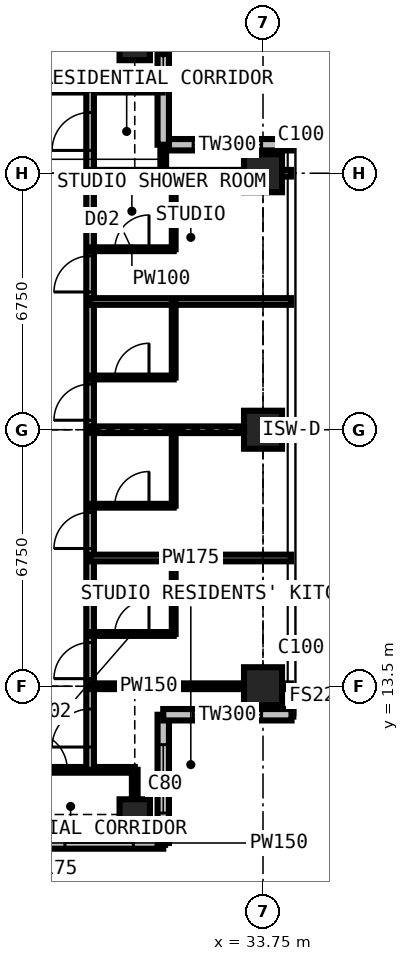
"""IFC4 building model, lengths in metres.
Left out: names, types, materials, properties, quantities, classifications, styles, units other than length and angle.
Written with IfcOpenShell. Run it as: python <this file> out.ifc"""

import sys

from ifc_helpers import new_model, si_unit, direction, frame, frame_2d, origin, origin_2d, place, context, subcontext, project, spatial, rectangle, extrude, element, fill, save


model = new_model("IFC4")
c1 = context("Model", 3, precision=1e-05, world=origin(), true_north=direction((0.0, 1.0)))
c2 = subcontext(c1, "Body", "Model", "MODEL_VIEW")
j1 = project(units=[si_unit("LENGTHUNIT", "METRE"), si_unit("PLANEANGLEUNIT", "RADIAN")], contexts=[c1])
p1 = place(None, origin())
s1 = spatial("IfcSite", under=j1, at=p1, CompositionType="ELEMENT")
p2 = place(p1, origin())
s2 = spatial("IfcBuilding", under=s1, at=p2, CompositionType="ELEMENT")
p3 = place(p2, frame((0.0, 0.0, 243.9)))
s3 = spatial("IfcBuildingStorey", under=s2, at=p3, CompositionType="ELEMENT", Elevation=243.9)
for number, where, z_axis, x_axis in (
    (1, (30.375, 10.125, 0.0), (0.0, 0.0, 1.0), (1.0, 0.0, 0.0)),
    (2, (30.375, 30.375, 0.0), (0.0, 0.0, 1.0), (1.0, 0.0, 0.0)),
):
    element("IfcColumn", number, at=place(p3, frame(where, z_axis=z_axis, x_axis=x_axis)), inside=s3, PredefinedType="COLUMN", context=c2, shape_type="SweptSolid", body=[
        extrude(rectangle(XDim=0.8, YDim=0.8, at=origin_2d()), origin(), (0.0, 0.0, 1.0), 3.6),
    ])
for number, where, z_axis, x_axis in (
    (3, (33.75, 13.5, 0.0), (0.0, 0.0, 1.0), (1.0, 0.0, 0.0)),
    (4, (33.75, 20.25, 0.0), (0.0, 0.0, 1.0), (1.0, 0.0, 0.0)),
    (5, (33.75, 27.0, 0.0), (0.0, 0.0, 1.0), (1.0, 0.0, 0.0)),
):
    element("IfcColumn", number, at=place(p3, frame(where, z_axis=z_axis, x_axis=x_axis)), inside=s3, PredefinedType="COLUMN", context=c2, shape_type="SweptSolid", body=[
        extrude(rectangle(XDim=1.0, YDim=1.0, at=origin_2d()), origin(), (0.0, 0.0, 1.0), 3.6),
    ])
p4 = place(p3, frame((34.5, 27.75, 0.0), z_axis=(0.0, 0.0, 1.0), x_axis=(-1.0, 0.0, 0.0)))
e6 = element("IfcWall", 6, at=p4, inside=s3, PredefinedType="SOLIDWALL", context=c2, shape_type="SweptSolid", body=[
    extrude(rectangle(XDim=3.375, YDim=0.3, at=frame_2d((1.688, 0.0))), origin(), (0.0, 0.0, 1.0), 3.375),
])
p5 = place(p4, frame((0.788, 0.0, 0.6)))
e7 = element("IfcOpeningElement", 7, at=p5, cuts=e6, PredefinedType="OPENING", context=c2, shape_type="SweptSolid", body=[
    extrude(rectangle(XDim=1.8, YDim=2.1, at=frame_2d((0.9, 1.05))), frame((0.0, 0.16, 0.0), z_axis=(0.0, -1.0, 0.0), x_axis=(1.0, 0.0, 0.0)), (0.0, 0.0, 1.0), 0.32),
])
p6 = place(p3, frame((31.125, 27.75, 0.0), z_axis=(0.0, 0.0, 1.0), x_axis=(0.0, 1.0, 0.0)))
e8 = element("IfcWall", 8, at=p6, inside=s3, PredefinedType="SOLIDWALL", context=c2, shape_type="SweptSolid", body=[
    extrude(rectangle(XDim=3.375, YDim=0.3, at=frame_2d((1.688, 0.0))), origin(), (0.0, 0.0, 1.0), 3.375),
])
p7 = place(p6, frame((1.663, 0.0, 0.9)))
e9 = element("IfcOpeningElement", 9, at=p7, cuts=e8, PredefinedType="OPENING", context=c2, shape_type="SweptSolid", body=[
    extrude(rectangle(XDim=1.5, YDim=1.8, at=frame_2d((0.75, 0.9))), frame((0.0, 0.16, 0.0), z_axis=(0.0, -1.0, 0.0), x_axis=(1.0, 0.0, 0.0)), (0.0, 0.0, 1.0), 0.32),
])
p8 = place(p3, frame((27.75, 9.375, 0.0), z_axis=(0.0, 0.0, 1.0), x_axis=(1.0, 0.0, 0.0)))
e10 = element("IfcWall", 10, at=p8, inside=s3, PredefinedType="SOLIDWALL", context=c2, shape_type="SweptSolid", body=[
    extrude(rectangle(XDim=3.375, YDim=0.3, at=frame_2d((1.688, 0.0))), origin(), (0.0, 0.0, 1.0), 3.375),
])
p9 = place(p8, frame((0.788, 0.0, 0.6)))
e11 = element("IfcOpeningElement", 11, at=p9, cuts=e10, PredefinedType="OPENING", context=c2, shape_type="SweptSolid", body=[
    extrude(rectangle(XDim=1.8, YDim=2.1, at=frame_2d((0.9, 1.05))), frame((0.0, 0.16, 0.0), z_axis=(0.0, -1.0, 0.0), x_axis=(1.0, 0.0, 0.0)), (0.0, 0.0, 1.0), 0.32),
])
p10 = place(p3, frame((31.125, 9.375, 0.0), z_axis=(0.0, 0.0, 1.0), x_axis=(0.0, 1.0, 0.0)))
e12 = element("IfcWall", 12, at=p10, inside=s3, PredefinedType="SOLIDWALL", context=c2, shape_type="SweptSolid", body=[
    extrude(rectangle(XDim=3.375, YDim=0.3, at=frame_2d((1.688, 0.0))), origin(), (0.0, 0.0, 1.0), 3.375),
])
p11 = place(p10, frame((0.788, 0.0, 0.6)))
e13 = element("IfcOpeningElement", 13, at=p11, cuts=e12, PredefinedType="OPENING", context=c2, shape_type="SweptSolid", body=[
    extrude(rectangle(XDim=1.8, YDim=2.1, at=frame_2d((0.9, 1.05))), frame((0.0, 0.16, 0.0), z_axis=(0.0, -1.0, 0.0), x_axis=(1.0, 0.0, 0.0)), (0.0, 0.0, 1.0), 0.32),
])
p12 = place(p3, frame((31.125, 12.75, 0.0), z_axis=(0.0, 0.0, 1.0), x_axis=(1.0, 0.0, 0.0)))
e14 = element("IfcWall", 14, at=p12, inside=s3, PredefinedType="SOLIDWALL", context=c2, shape_type="SweptSolid", body=[
    extrude(rectangle(XDim=3.375, YDim=0.3, at=frame_2d((1.688, 0.0))), origin(), (0.0, 0.0, 1.0), 3.375),
])
p13 = place(p12, frame((0.788, 0.0, 0.6)))
e15 = element("IfcOpeningElement", 15, at=p13, cuts=e14, PredefinedType="OPENING", context=c2, shape_type="SweptSolid", body=[
    extrude(rectangle(XDim=1.8, YDim=2.1, at=frame_2d((0.9, 1.05))), frame((0.0, 0.16, 0.0), z_axis=(0.0, -1.0, 0.0), x_axis=(1.0, 0.0, 0.0)), (0.0, 0.0, 1.0), 0.32),
])
p14 = place(p3, frame((11.3, 29.2, 0.0), z_axis=(0.0, 0.0, 1.0), x_axis=(1.0, 0.0, 0.0)))
e16 = element("IfcWall", 16, at=p14, inside=s3, PredefinedType="PARTITIONING", context=c2, shape_type="SweptSolid", body=[
    extrude(rectangle(XDim=19.809, YDim=0.15, at=frame_2d((9.904, 0.0))), origin(), (0.0, 0.0, 1.0), 3.375),
])
p15 = place(p14, frame((14.625, 0.0, 0.0)))
e17 = element("IfcOpeningElement", 17, at=p15, cuts=e16, PredefinedType="OPENING", context=c2, shape_type="SweptSolid", body=[
    extrude(rectangle(XDim=1.0, YDim=2.2, at=frame_2d((0.5, 1.1))), frame((0.0, 0.085, 0.0), z_axis=(0.0, -1.0, 0.0), x_axis=(1.0, 0.0, 0.0)), (0.0, 0.0, 1.0), 0.17),
])
p16 = place(p14, frame((6.4, 0.0, 0.0)))
e18 = element("IfcOpeningElement", 18, at=p16, cuts=e16, PredefinedType="OPENING", context=c2, shape_type="SweptSolid", body=[
    extrude(rectangle(XDim=0.95, YDim=2.2, at=frame_2d((0.475, 1.1))), frame((0.0, 0.085, 0.0), z_axis=(0.0, -1.0, 0.0), x_axis=(1.0, 0.0, 0.0)), (0.0, 0.0, 1.0), 0.17),
])
p17 = place(p14, frame((9.2, 0.0, 0.0)))
e19 = element("IfcOpeningElement", 19, at=p17, cuts=e16, PredefinedType="OPENING", context=c2, shape_type="SweptSolid", body=[
    extrude(rectangle(XDim=0.95, YDim=2.2, at=frame_2d((0.475, 1.1))), frame((0.0, 0.085, 0.0), z_axis=(0.0, -1.0, 0.0), x_axis=(1.0, 0.0, 0.0)), (0.0, 0.0, 1.0), 0.17),
])
p18 = place(p14, frame((0.6, 0.0, 0.0)))
e20 = element("IfcOpeningElement", 20, at=p18, cuts=e16, PredefinedType="OPENING", context=c2, shape_type="SweptSolid", body=[
    extrude(rectangle(XDim=1.0, YDim=2.2, at=frame_2d((0.5, 1.1))), frame((0.0, 0.085, 0.0), z_axis=(0.0, -1.0, 0.0), x_axis=(1.0, 0.0, 0.0)), (0.0, 0.0, 1.0), 0.17),
])
p19 = place(p3, frame((27.0, 11.3, 0.0), z_axis=(0.0, 0.0, 1.0), x_axis=(1.0, 0.0, 0.0)))
e21 = element("IfcWall", 21, at=p19, inside=s3, PredefinedType="PARTITIONING", context=c2, shape_type="SweptSolid", body=[
    extrude(rectangle(XDim=3.375, YDim=0.15, at=frame_2d((1.688, 0.0))), origin(), (0.0, 0.0, 1.0), 3.375),
])
p20 = place(p19, frame((0.6, 0.0, 0.0)))
e22 = element("IfcOpeningElement", 22, at=p20, cuts=e21, PredefinedType="OPENING", context=c2, shape_type="SweptSolid", body=[
    extrude(rectangle(XDim=1.0, YDim=2.2, at=frame_2d((0.5, 1.1))), frame((0.0, 0.085, 0.0), z_axis=(0.0, -1.0, 0.0), x_axis=(1.0, 0.0, 0.0)), (0.0, 0.0, 1.0), 0.17),
])
p21 = place(p3, frame((29.2, 11.3, 0.0), z_axis=(0.0, 0.0, 1.0), x_axis=(0.0, 1.0, 0.0)))
e23 = element("IfcWall", 23, at=p21, inside=s3, PredefinedType="PARTITIONING", context=c2, shape_type="SweptSolid", body=[
    extrude(rectangle(XDim=17.9, YDim=0.2, at=frame_2d((8.95, 0.0))), origin(), (0.0, 0.0, 1.0), 3.375),
])
p22 = place(p21, frame((0.6, 0.0, 0.0)))
e24 = element("IfcOpeningElement", 24, at=p22, cuts=e23, PredefinedType="OPENING", context=c2, shape_type="SweptSolid", body=[
    extrude(rectangle(XDim=1.0, YDim=2.2, at=frame_2d((0.5, 1.1))), frame((0.0, 0.11, 0.0), z_axis=(0.0, -1.0, 0.0), x_axis=(1.0, 0.0, 0.0)), (0.0, 0.0, 1.0), 0.22),
])
p23 = place(p21, frame((2.4, 0.0, 0.0)))
e25 = element("IfcOpeningElement", 25, at=p23, cuts=e23, PredefinedType="OPENING", context=c2, shape_type="SweptSolid", body=[
    extrude(rectangle(XDim=0.95, YDim=2.2, at=frame_2d((0.475, 1.1))), frame((0.0, 0.11, 0.0), z_axis=(0.0, -1.0, 0.0), x_axis=(1.0, 0.0, 0.0)), (0.0, 0.0, 1.0), 0.22),
])
p24 = place(p21, frame((5.825, 0.0, 0.0)))
e26 = element("IfcOpeningElement", 26, at=p24, cuts=e23, PredefinedType="OPENING", context=c2, shape_type="SweptSolid", body=[
    extrude(rectangle(XDim=0.95, YDim=2.2, at=frame_2d((0.475, 1.1))), frame((0.0, 0.11, 0.0), z_axis=(0.0, -1.0, 0.0), x_axis=(1.0, 0.0, 0.0)), (0.0, 0.0, 1.0), 0.22),
])
p25 = place(p21, frame((9.2, 0.0, 0.0)))
e27 = element("IfcOpeningElement", 27, at=p25, cuts=e23, PredefinedType="OPENING", context=c2, shape_type="SweptSolid", body=[
    extrude(rectangle(XDim=0.95, YDim=2.2, at=frame_2d((0.475, 1.1))), frame((0.0, 0.11, 0.0), z_axis=(0.0, -1.0, 0.0), x_axis=(1.0, 0.0, 0.0)), (0.0, 0.0, 1.0), 0.22),
])
p26 = place(p21, frame((12.575, 0.0, 0.0)))
e28 = element("IfcOpeningElement", 28, at=p26, cuts=e23, PredefinedType="OPENING", context=c2, shape_type="SweptSolid", body=[
    extrude(rectangle(XDim=0.95, YDim=2.2, at=frame_2d((0.475, 1.1))), frame((0.0, 0.11, 0.0), z_axis=(0.0, -1.0, 0.0), x_axis=(1.0, 0.0, 0.0)), (0.0, 0.0, 1.0), 0.22),
])
p27 = place(p21, frame((16.3, 0.0, 0.0)))
e29 = element("IfcOpeningElement", 29, at=p27, cuts=e23, PredefinedType="OPENING", context=c2, shape_type="SweptSolid", body=[
    extrude(rectangle(XDim=1.0, YDim=2.2, at=frame_2d((0.5, 1.1))), frame((0.0, 0.11, 0.0), z_axis=(0.0, -1.0, 0.0), x_axis=(1.0, 0.0, 0.0)), (0.0, 0.0, 1.0), 0.22),
])
p28 = place(p3, frame((29.2, 13.5, 0.0), z_axis=(0.0, 0.0, 1.0), x_axis=(1.0, 0.0, 0.0)))
e30 = element("IfcWall", 30, at=p28, inside=s3, PredefinedType="PARTITIONING", context=c2, shape_type="SweptSolid", body=[
    extrude(rectangle(XDim=5.284, YDim=0.15, at=frame_2d((2.642, 0.0))), origin(), (0.0, 0.0, 1.0), 2.877),
])
p29 = place(p3, frame((29.2, 14.875, 0.0), z_axis=(0.0, 0.0, 1.0), x_axis=(1.0, 0.0, 0.0)))
e31 = element("IfcWall", 31, at=p29, inside=s3, PredefinedType="PARTITIONING", context=c2, shape_type="SweptSolid", body=[
    extrude(rectangle(XDim=2.2, YDim=0.1, at=frame_2d((1.1, 0.0))), origin(), (0.0, 0.0, 1.0), 3.375),
])
p30 = place(p29, frame((0.65, 0.0, 0.0)))
e32 = element("IfcOpeningElement", 32, at=p30, cuts=e31, PredefinedType="OPENING", context=c2, shape_type="SweptSolid", body=[
    extrude(rectangle(XDim=0.9, YDim=2.2, at=frame_2d((0.45, 1.1))), frame((0.0, 0.06, 0.0), z_axis=(0.0, -1.0, 0.0), x_axis=(1.0, 0.0, 0.0)), (0.0, 0.0, 1.0), 0.12),
])
p31 = place(p3, frame((29.2, 16.875, 0.0), z_axis=(0.0, 0.0, 1.0), x_axis=(1.0, 0.0, 0.0)))
e33 = element("IfcWall", 33, at=p31, inside=s3, PredefinedType="PARTITIONING", context=c2, shape_type="SweptSolid", body=[
    extrude(rectangle(XDim=5.284, YDim=0.175, at=frame_2d((2.642, 0.0))), origin(), (0.0, 0.0, 1.0), 3.375),
])
p32 = place(p3, frame((29.2, 18.25, 0.0), z_axis=(0.0, 0.0, 1.0), x_axis=(1.0, 0.0, 0.0)))
e34 = element("IfcWall", 34, at=p32, inside=s3, PredefinedType="PARTITIONING", context=c2, shape_type="SweptSolid", body=[
    extrude(rectangle(XDim=2.2, YDim=0.1, at=frame_2d((1.1, 0.0))), origin(), (0.0, 0.0, 1.0), 3.375),
])
p33 = place(p32, frame((0.65, 0.0, 0.0)))
e35 = element("IfcOpeningElement", 35, at=p33, cuts=e34, PredefinedType="OPENING", context=c2, shape_type="SweptSolid", body=[
    extrude(rectangle(XDim=0.9, YDim=2.2, at=frame_2d((0.45, 1.1))), frame((0.0, 0.06, 0.0), z_axis=(0.0, -1.0, 0.0), x_axis=(1.0, 0.0, 0.0)), (0.0, 0.0, 1.0), 0.12),
])
p34 = place(p3, frame((29.2, 20.25, 0.0), z_axis=(0.0, 0.0, 1.0), x_axis=(1.0, 0.0, 0.0)))
e36 = element("IfcWall", 36, at=p34, inside=s3, PredefinedType="PARTITIONING", context=c2, shape_type="SweptSolid", body=[
    extrude(rectangle(XDim=5.284, YDim=0.175, at=frame_2d((2.642, 0.0))), origin(), (0.0, 0.0, 1.0), 2.877),
])
p35 = place(p3, frame((29.2, 21.625, 0.0), z_axis=(0.0, 0.0, 1.0), x_axis=(1.0, 0.0, 0.0)))
e37 = element("IfcWall", 37, at=p35, inside=s3, PredefinedType="PARTITIONING", context=c2, shape_type="SweptSolid", body=[
    extrude(rectangle(XDim=2.2, YDim=0.1, at=frame_2d((1.1, 0.0))), origin(), (0.0, 0.0, 1.0), 3.375),
])
p36 = place(p35, frame((0.65, 0.0, 0.0)))
e38 = element("IfcOpeningElement", 38, at=p36, cuts=e37, PredefinedType="OPENING", context=c2, shape_type="SweptSolid", body=[
    extrude(rectangle(XDim=0.9, YDim=2.2, at=frame_2d((0.45, 1.1))), frame((0.0, 0.06, 0.0), z_axis=(0.0, -1.0, 0.0), x_axis=(1.0, 0.0, 0.0)), (0.0, 0.0, 1.0), 0.12),
])
p37 = place(p3, frame((29.2, 23.625, 0.0), z_axis=(0.0, 0.0, 1.0), x_axis=(1.0, 0.0, 0.0)))
e39 = element("IfcWall", 39, at=p37, inside=s3, PredefinedType="PARTITIONING", context=c2, shape_type="SweptSolid", body=[
    extrude(rectangle(XDim=5.284, YDim=0.175, at=frame_2d((2.642, 0.0))), origin(), (0.0, 0.0, 1.0), 3.375),
])
p38 = place(p3, frame((29.2, 25.0, 0.0), z_axis=(0.0, 0.0, 1.0), x_axis=(1.0, 0.0, 0.0)))
e40 = element("IfcWall", 40, at=p38, inside=s3, PredefinedType="PARTITIONING", context=c2, shape_type="SweptSolid", body=[
    extrude(rectangle(XDim=2.2, YDim=0.1, at=frame_2d((1.1, 0.0))), origin(), (0.0, 0.0, 1.0), 3.375),
])
p39 = place(p38, frame((0.65, 0.0, 0.0)))
e41 = element("IfcOpeningElement", 41, at=p39, cuts=e40, PredefinedType="OPENING", context=c2, shape_type="SweptSolid", body=[
    extrude(rectangle(XDim=0.9, YDim=2.2, at=frame_2d((0.45, 1.1))), frame((0.0, 0.06, 0.0), z_axis=(0.0, -1.0, 0.0), x_axis=(1.0, 0.0, 0.0)), (0.0, 0.0, 1.0), 0.12),
])
p40 = place(p3, frame((29.2, 27.0, 0.0), z_axis=(0.0, 0.0, 1.0), x_axis=(1.0, 0.0, 0.0)))
e42 = element("IfcWall", 42, at=p40, inside=s3, PredefinedType="PARTITIONING", context=c2, shape_type="SweptSolid", body=[
    extrude(rectangle(XDim=5.284, YDim=0.175, at=frame_2d((2.642, 0.0))), origin(), (0.0, 0.0, 1.0), 2.877),
])
p41 = place(p3, frame((30.375, 9.525, 0.0), z_axis=(0.0, 0.0, 1.0), x_axis=(0.0, 1.0, 0.0)))
e43 = element("IfcWall", 43, at=p41, inside=s3, PredefinedType="PARTITIONING", context=c2, shape_type="SweptSolid", body=[
    extrude(rectangle(XDim=1.775, YDim=0.15, at=frame_2d((0.888, 0.0))), origin(), (0.0, 0.0, 1.0), 2.877),
])
p42 = place(p3, frame((31.125, 27.0, 0.0), z_axis=(0.0, 0.0, 1.0), x_axis=(0.0, 1.0, 0.0)))
e44 = element("IfcWall", 44, at=p42, inside=s3, PredefinedType="PARTITIONING", context=c2, shape_type="SweptSolid", body=[
    extrude(rectangle(XDim=0.734, YDim=0.15, at=frame_2d((0.367, 0.0))), origin(), (0.0, 0.0, 1.0), 3.375),
])
for number, where, z_axis, x_axis in (
    (45, (31.4, 14.875, 0.0), (0.0, 0.0, 1.0), (0.0, 1.0, 0.0)),
    (46, (31.4, 18.25, 0.0), (0.0, 0.0, 1.0), (0.0, 1.0, 0.0)),
    (47, (31.4, 21.625, 0.0), (0.0, 0.0, 1.0), (0.0, 1.0, 0.0)),
    (48, (31.4, 25.0, 0.0), (0.0, 0.0, 1.0), (0.0, 1.0, 0.0)),
):
    element("IfcWall", number, at=place(p3, frame(where, z_axis=z_axis, x_axis=x_axis)), inside=s3, PredefinedType="PARTITIONING", context=c2, shape_type="SweptSolid", body=[
        extrude(rectangle(XDim=2.0, YDim=0.1, at=frame_2d((1.0, 0.0))), origin(), (0.0, 0.0, 1.0), 3.375),
    ])
p43 = place(p5, origin())
e49 = element("IfcWindow", 49, at=p43, inside=s3, PartitioningType="SINGLE_PANEL", PredefinedType="WINDOW", context=c2, shape_type="SweptSolid", body=[
    extrude(rectangle(XDim=1.8, YDim=2.1, at=frame_2d((0.9, 1.05))), frame((0.0, 0.03, 0.0), z_axis=(0.0, -1.0, 0.0), x_axis=(1.0, 0.0, 0.0)), (0.0, 0.0, 1.0), 0.06),
])
fill(e7, e49)
p44 = place(p7, origin())
e50 = element("IfcWindow", 50, at=p44, inside=s3, PartitioningType="SINGLE_PANEL", PredefinedType="WINDOW", context=c2, shape_type="SweptSolid", body=[
    extrude(rectangle(XDim=1.5, YDim=1.8, at=frame_2d((0.75, 0.9))), frame((0.0, 0.03, 0.0), z_axis=(0.0, -1.0, 0.0), x_axis=(1.0, 0.0, 0.0)), (0.0, 0.0, 1.0), 0.06),
])
fill(e9, e50)
p45 = place(p9, origin())
e51 = element("IfcWindow", 51, at=p45, inside=s3, PartitioningType="SINGLE_PANEL", PredefinedType="WINDOW", context=c2, shape_type="SweptSolid", body=[
    extrude(rectangle(XDim=1.8, YDim=2.1, at=frame_2d((0.9, 1.05))), frame((0.0, 0.03, 0.0), z_axis=(0.0, -1.0, 0.0), x_axis=(1.0, 0.0, 0.0)), (0.0, 0.0, 1.0), 0.06),
])
fill(e11, e51)
p46 = place(p11, origin())
e52 = element("IfcWindow", 52, at=p46, inside=s3, PartitioningType="SINGLE_PANEL", PredefinedType="WINDOW", context=c2, shape_type="SweptSolid", body=[
    extrude(rectangle(XDim=1.8, YDim=2.1, at=frame_2d((0.9, 1.05))), frame((0.0, 0.03, 0.0), z_axis=(0.0, -1.0, 0.0), x_axis=(1.0, 0.0, 0.0)), (0.0, 0.0, 1.0), 0.06),
])
fill(e13, e52)
p47 = place(p13, origin())
e53 = element("IfcWindow", 53, at=p47, inside=s3, PartitioningType="SINGLE_PANEL", PredefinedType="WINDOW", context=c2, shape_type="SweptSolid", body=[
    extrude(rectangle(XDim=1.8, YDim=2.1, at=frame_2d((0.9, 1.05))), frame((0.0, 0.03, 0.0), z_axis=(0.0, -1.0, 0.0), x_axis=(1.0, 0.0, 0.0)), (0.0, 0.0, 1.0), 0.06),
])
fill(e15, e53)
p48 = place(p20, origin())
e54 = element("IfcDoor", 54, at=p48, inside=s3, OperationType="SINGLE_SWING_LEFT", PredefinedType="DOOR", context=c2, shape_type="SweptSolid", body=[
    extrude(rectangle(XDim=1.0, YDim=2.2, at=frame_2d((0.5, 1.1))), frame((0.0, 0.025, 0.0), z_axis=(0.0, -1.0, 0.0), x_axis=(1.0, 0.0, 0.0)), (0.0, 0.0, 1.0), 0.05),
])
fill(e22, e54)
p49 = place(p22, origin())
e55 = element("IfcDoor", 55, at=p49, inside=s3, OperationType="SINGLE_SWING_LEFT", PredefinedType="DOOR", context=c2, shape_type="SweptSolid", body=[
    extrude(rectangle(XDim=1.0, YDim=2.2, at=frame_2d((0.5, 1.1))), frame((0.0, 0.025, 0.0), z_axis=(0.0, -1.0, 0.0), x_axis=(1.0, 0.0, 0.0)), (0.0, 0.0, 1.0), 0.05),
])
fill(e24, e55)
p50 = place(p23, origin())
e56 = element("IfcDoor", 56, at=p50, inside=s3, OperationType="SINGLE_SWING_LEFT", PredefinedType="DOOR", context=c2, shape_type="SweptSolid", body=[
    extrude(rectangle(XDim=0.95, YDim=2.2, at=frame_2d((0.475, 1.1))), frame((0.0, 0.025, 0.0), z_axis=(0.0, -1.0, 0.0), x_axis=(1.0, 0.0, 0.0)), (0.0, 0.0, 1.0), 0.05),
])
fill(e25, e56)
p51 = place(p30, origin())
e57 = element("IfcDoor", 57, at=p51, inside=s3, OperationType="SINGLE_SWING_RIGHT", PredefinedType="DOOR", context=c2, shape_type="SweptSolid", body=[
    extrude(rectangle(XDim=0.9, YDim=2.2, at=frame_2d((0.45, 1.1))), frame((0.0, 0.025, 0.0), z_axis=(0.0, -1.0, 0.0), x_axis=(1.0, 0.0, 0.0)), (0.0, 0.0, 1.0), 0.05),
])
fill(e32, e57)
p52 = place(p24, origin())
e58 = element("IfcDoor", 58, at=p52, inside=s3, OperationType="SINGLE_SWING_LEFT", PredefinedType="DOOR", context=c2, shape_type="SweptSolid", body=[
    extrude(rectangle(XDim=0.95, YDim=2.2, at=frame_2d((0.475, 1.1))), frame((0.0, 0.025, 0.0), z_axis=(0.0, -1.0, 0.0), x_axis=(1.0, 0.0, 0.0)), (0.0, 0.0, 1.0), 0.05),
])
fill(e26, e58)
p53 = place(p33, origin())
e59 = element("IfcDoor", 59, at=p53, inside=s3, OperationType="SINGLE_SWING_RIGHT", PredefinedType="DOOR", context=c2, shape_type="SweptSolid", body=[
    extrude(rectangle(XDim=0.9, YDim=2.2, at=frame_2d((0.45, 1.1))), frame((0.0, 0.025, 0.0), z_axis=(0.0, -1.0, 0.0), x_axis=(1.0, 0.0, 0.0)), (0.0, 0.0, 1.0), 0.05),
])
fill(e35, e59)
p54 = place(p25, origin())
e60 = element("IfcDoor", 60, at=p54, inside=s3, OperationType="SINGLE_SWING_LEFT", PredefinedType="DOOR", context=c2, shape_type="SweptSolid", body=[
    extrude(rectangle(XDim=0.95, YDim=2.2, at=frame_2d((0.475, 1.1))), frame((0.0, 0.025, 0.0), z_axis=(0.0, -1.0, 0.0), x_axis=(1.0, 0.0, 0.0)), (0.0, 0.0, 1.0), 0.05),
])
fill(e27, e60)
p55 = place(p36, origin())
e61 = element("IfcDoor", 61, at=p55, inside=s3, OperationType="SINGLE_SWING_RIGHT", PredefinedType="DOOR", context=c2, shape_type="SweptSolid", body=[
    extrude(rectangle(XDim=0.9, YDim=2.2, at=frame_2d((0.45, 1.1))), frame((0.0, 0.025, 0.0), z_axis=(0.0, -1.0, 0.0), x_axis=(1.0, 0.0, 0.0)), (0.0, 0.0, 1.0), 0.05),
])
fill(e38, e61)
p56 = place(p26, origin())
e62 = element("IfcDoor", 62, at=p56, inside=s3, OperationType="SINGLE_SWING_LEFT", PredefinedType="DOOR", context=c2, shape_type="SweptSolid", body=[
    extrude(rectangle(XDim=0.95, YDim=2.2, at=frame_2d((0.475, 1.1))), frame((0.0, 0.025, 0.0), z_axis=(0.0, -1.0, 0.0), x_axis=(1.0, 0.0, 0.0)), (0.0, 0.0, 1.0), 0.05),
])
fill(e28, e62)
p57 = place(p39, origin())
e63 = element("IfcDoor", 63, at=p57, inside=s3, OperationType="SINGLE_SWING_RIGHT", PredefinedType="DOOR", context=c2, shape_type="SweptSolid", body=[
    extrude(rectangle(XDim=0.9, YDim=2.2, at=frame_2d((0.45, 1.1))), frame((0.0, 0.025, 0.0), z_axis=(0.0, -1.0, 0.0), x_axis=(1.0, 0.0, 0.0)), (0.0, 0.0, 1.0), 0.05),
])
fill(e41, e63)
p58 = place(p27, origin())
e64 = element("IfcDoor", 64, at=p58, inside=s3, OperationType="SINGLE_SWING_LEFT", PredefinedType="DOOR", context=c2, shape_type="SweptSolid", body=[
    extrude(rectangle(XDim=1.0, YDim=2.2, at=frame_2d((0.5, 1.1))), frame((0.0, 0.025, 0.0), z_axis=(0.0, -1.0, 0.0), x_axis=(1.0, 0.0, 0.0)), (0.0, 0.0, 1.0), 0.05),
])
fill(e29, e64)
save(model, sys.argv[1])
